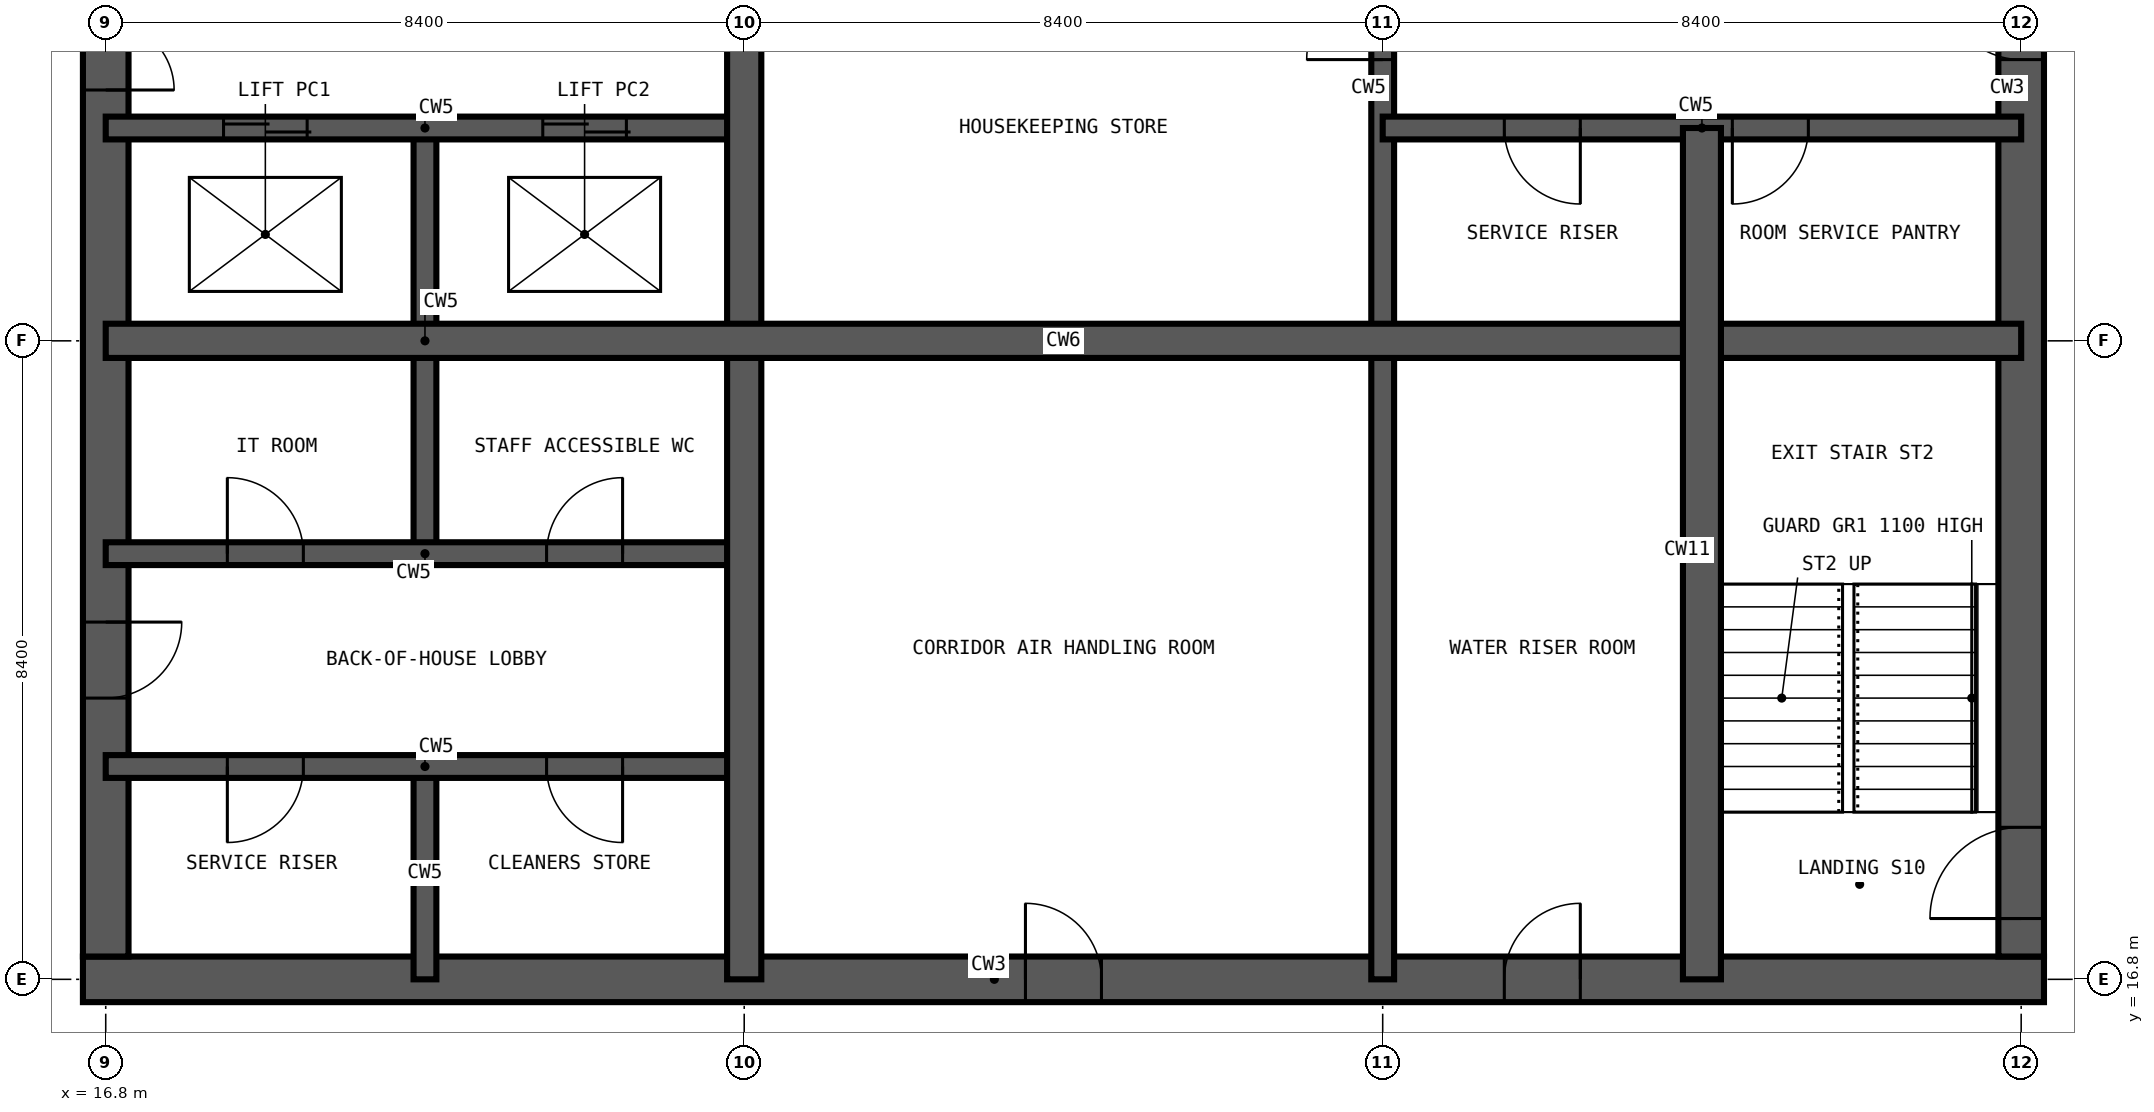
"""IFC4 building model, lengths in metres.
Left out: names, types, materials, properties, quantities, classifications, styles, units other than length and angle.
Written with IfcOpenShell. Run it as: python <this file> out.ifc"""

import sys

from ifc_helpers import new_model, si_unit, direction, frame, frame_2d, origin, place, context, subcontext, project, spatial, rectangle, extrude, element, fill, save


model = new_model("IFC4")
c1 = context("Model", 3, precision=1e-05, world=origin(), true_north=direction((0.0, 1.0)))
c2 = subcontext(c1, "Body", "Model", "MODEL_VIEW")
j1 = project(units=[si_unit("LENGTHUNIT", "METRE"), si_unit("PLANEANGLEUNIT", "RADIAN")], contexts=[c1])
p1 = place(None, origin())
s1 = spatial("IfcSite", under=j1, at=p1, CompositionType="ELEMENT")
p2 = place(p1, origin())
s2 = spatial("IfcBuilding", under=s1, at=p2, CompositionType="ELEMENT")
p3 = place(p2, frame((0.0, 0.0, 198.6)))
s3 = spatial("IfcBuildingStorey", under=s2, at=p3, CompositionType="ELEMENT", Elevation=198.6)
p4 = place(p3, frame((16.5, 16.8, -0.35), z_axis=(0.0, 0.0, 1.0), x_axis=(1.0, 0.0, 0.0)))
e1 = element("IfcWall", 1, at=p4, inside=s3, PredefinedType="SHEAR", context=c2, shape_type="SweptSolid", body=[
    extrude(rectangle(XDim=25.8, YDim=0.6, at=frame_2d((12.9, 0.0))), origin(), (0.0, 0.0, 1.0), 3.6),
])
p5 = place(p4, frame((12.4, 0.0, 0.35)))
e2 = element("IfcOpeningElement", 2, at=p5, cuts=e1, PredefinedType="OPENING", context=c2, shape_type="SweptSolid", body=[
    extrude(rectangle(XDim=1.0, YDim=2.1, at=frame_2d((0.5, 1.05))), frame((0.0, 0.31, 0.0), z_axis=(0.0, -1.0, 0.0), x_axis=(1.0, 0.0, 0.0)), (0.0, 0.0, 1.0), 0.62),
])
p6 = place(p4, frame((18.7, 0.0, 0.35)))
e3 = element("IfcOpeningElement", 3, at=p6, cuts=e1, PredefinedType="OPENING", context=c2, shape_type="SweptSolid", body=[
    extrude(rectangle(XDim=1.0, YDim=2.1, at=frame_2d((0.5, 1.05))), frame((0.0, 0.31, 0.0), z_axis=(0.0, -1.0, 0.0), x_axis=(1.0, 0.0, 0.0)), (0.0, 0.0, 1.0), 0.62),
])
p7 = place(p3, frame((42.0, 17.1, -0.35), z_axis=(0.0, 0.0, 1.0), x_axis=(0.0, 1.0, 0.0)))
e4 = element("IfcWall", 4, at=p7, inside=s3, PredefinedType="SHEAR", context=c2, shape_type="SweptSolid", body=[
    extrude(rectangle(XDim=24.6, YDim=0.6, at=frame_2d((12.3, 0.0))), origin(), (0.0, 0.0, 1.0), 3.6),
])
p8 = place(p7, frame((0.5, 0.0, 0.35)))
e5 = element("IfcOpeningElement", 5, at=p8, cuts=e4, PredefinedType="OPENING", context=c2, shape_type="SweptSolid", body=[
    extrude(rectangle(XDim=1.2, YDim=2.2, at=frame_2d((0.6, 1.1))), frame((0.0, 0.31, 0.0), z_axis=(0.0, -1.0, 0.0), x_axis=(1.0, 0.0, 0.0)), (0.0, 0.0, 1.0), 0.62),
])
p9 = place(p7, frame((11.8, 0.0, 0.35)))
e6 = element("IfcOpeningElement", 6, at=p9, cuts=e4, PredefinedType="OPENING", context=c2, shape_type="SweptSolid", body=[
    extrude(rectangle(XDim=1.0, YDim=2.1, at=frame_2d((0.5, 1.05))), frame((0.0, 0.31, 0.0), z_axis=(0.0, -1.0, 0.0), x_axis=(1.0, 0.0, 0.0)), (0.0, 0.0, 1.0), 0.62),
])
p10 = place(p7, frame((20.2, 0.0, 0.35)))
e7 = element("IfcOpeningElement", 7, at=p10, cuts=e4, PredefinedType="OPENING", context=c2, shape_type="SweptSolid", body=[
    extrude(rectangle(XDim=1.0, YDim=2.1, at=frame_2d((0.5, 1.05))), frame((0.0, 0.31, 0.0), z_axis=(0.0, -1.0, 0.0), x_axis=(1.0, 0.0, 0.0)), (0.0, 0.0, 1.0), 0.62),
])
p11 = place(p3, frame((16.8, 41.7, -0.35), z_axis=(0.0, 0.0, 1.0), x_axis=(0.0, -1.0, 0.0)))
e8 = element("IfcWall", 8, at=p11, inside=s3, PredefinedType="SHEAR", context=c2, shape_type="SweptSolid", body=[
    extrude(rectangle(XDim=24.6, YDim=0.6, at=frame_2d((12.3, 0.0))), origin(), (0.0, 0.0, 1.0), 3.6),
])
p12 = place(p11, frame((11.4, 0.0, 0.35)))
e9 = element("IfcOpeningElement", 9, at=p12, cuts=e8, PredefinedType="OPENING", context=c2, shape_type="SweptSolid", body=[
    extrude(rectangle(XDim=1.8, YDim=2.2, at=frame_2d((0.9, 1.1))), frame((0.0, 0.31, 0.0), z_axis=(0.0, -1.0, 0.0), x_axis=(1.0, 0.0, 0.0)), (0.0, 0.0, 1.0), 0.62),
])
p13 = place(p11, frame((20.2, 0.0, 0.35)))
e10 = element("IfcOpeningElement", 10, at=p13, cuts=e8, PredefinedType="OPENING", context=c2, shape_type="SweptSolid", body=[
    extrude(rectangle(XDim=1.0, YDim=2.1, at=frame_2d((0.5, 1.05))), frame((0.0, 0.31, 0.0), z_axis=(0.0, -1.0, 0.0), x_axis=(1.0, 0.0, 0.0)), (0.0, 0.0, 1.0), 0.62),
])
p14 = place(p11, frame((5.5, 0.0, 0.35)))
e11 = element("IfcOpeningElement", 11, at=p14, cuts=e8, PredefinedType="OPENING", context=c2, shape_type="SweptSolid", body=[
    extrude(rectangle(XDim=1.0, YDim=2.1, at=frame_2d((0.5, 1.05))), frame((0.0, 0.31, 0.0), z_axis=(0.0, -1.0, 0.0), x_axis=(1.0, 0.0, 0.0)), (0.0, 0.0, 1.0), 0.62),
])
p15 = place(p3, frame((21.0, 16.8, -0.35), z_axis=(0.0, 0.0, 1.0), x_axis=(0.0, 1.0, 0.0)))
e12 = element("IfcWall", 12, at=p15, inside=s3, PredefinedType="SHEAR", context=c2, shape_type="SweptSolid", body=[
    extrude(rectangle(XDim=2.8, YDim=0.3, at=frame_2d((1.4, 0.0))), origin(), (0.0, 0.0, 1.0), 3.6),
])
p16 = place(p3, frame((21.0, 22.4, -0.35), z_axis=(0.0, 0.0, 1.0), x_axis=(0.0, 1.0, 0.0)))
e13 = element("IfcWall", 13, at=p16, inside=s3, PredefinedType="SHEAR", context=c2, shape_type="SweptSolid", body=[
    extrude(rectangle(XDim=5.6, YDim=0.3, at=frame_2d((2.8, 0.0))), origin(), (0.0, 0.0, 1.0), 3.6),
])
p17 = place(p3, frame((33.6, 16.8, -0.35), z_axis=(0.0, 0.0, 1.0), x_axis=(0.0, 1.0, 0.0)))
e14 = element("IfcWall", 14, at=p17, inside=s3, PredefinedType="SHEAR", context=c2, shape_type="SweptSolid", body=[
    extrude(rectangle(XDim=25.2, YDim=0.3, at=frame_2d((12.6, 0.0))), origin(), (0.0, 0.0, 1.0), 3.6),
])
p18 = place(p17, frame((22.5, 0.0, 0.35)))
e15 = element("IfcOpeningElement", 15, at=p18, cuts=e14, PredefinedType="OPENING", context=c2, shape_type="SweptSolid", body=[
    extrude(rectangle(XDim=1.2, YDim=2.2, at=frame_2d((0.6, 1.1))), frame((0.0, 0.16, 0.0), z_axis=(0.0, -1.0, 0.0), x_axis=(1.0, 0.0, 0.0)), (0.0, 0.0, 1.0), 0.32),
])
p19 = place(p17, frame((18.3, 0.0, 0.35)))
e16 = element("IfcOpeningElement", 16, at=p19, cuts=e14, PredefinedType="OPENING", context=c2, shape_type="SweptSolid", body=[
    extrude(rectangle(XDim=1.2, YDim=2.2, at=frame_2d((0.6, 1.1))), frame((0.0, 0.16, 0.0), z_axis=(0.0, -1.0, 0.0), x_axis=(1.0, 0.0, 0.0)), (0.0, 0.0, 1.0), 0.32),
])
p20 = place(p17, frame((12.1, 0.0, 0.35)))
e17 = element("IfcOpeningElement", 17, at=p20, cuts=e14, PredefinedType="OPENING", context=c2, shape_type="SweptSolid", body=[
    extrude(rectangle(XDim=1.0, YDim=2.1, at=frame_2d((0.5, 1.05))), frame((0.0, 0.16, 0.0), z_axis=(0.0, -1.0, 0.0), x_axis=(1.0, 0.0, 0.0)), (0.0, 0.0, 1.0), 0.32),
])
p21 = place(p3, frame((16.8, 19.6, -0.35), z_axis=(0.0, 0.0, 1.0), x_axis=(1.0, 0.0, 0.0)))
e18 = element("IfcWall", 18, at=p21, inside=s3, PredefinedType="SHEAR", context=c2, shape_type="SweptSolid", body=[
    extrude(rectangle(XDim=8.4, YDim=0.3, at=frame_2d((4.2, 0.0))), origin(), (0.0, 0.0, 1.0), 3.6),
])
p22 = place(p21, frame((1.6, 0.0, 0.35)))
e19 = element("IfcOpeningElement", 19, at=p22, cuts=e18, PredefinedType="OPENING", context=c2, shape_type="SweptSolid", body=[
    extrude(rectangle(XDim=1.0, YDim=2.1, at=frame_2d((0.5, 1.05))), frame((0.0, 0.16, 0.0), z_axis=(0.0, -1.0, 0.0), x_axis=(1.0, 0.0, 0.0)), (0.0, 0.0, 1.0), 0.32),
])
p23 = place(p21, frame((5.8, 0.0, 0.35)))
e20 = element("IfcOpeningElement", 20, at=p23, cuts=e18, PredefinedType="OPENING", context=c2, shape_type="SweptSolid", body=[
    extrude(rectangle(XDim=1.0, YDim=2.1, at=frame_2d((0.5, 1.05))), frame((0.0, 0.16, 0.0), z_axis=(0.0, -1.0, 0.0), x_axis=(1.0, 0.0, 0.0)), (0.0, 0.0, 1.0), 0.32),
])
p24 = place(p3, frame((16.8, 22.4, -0.35), z_axis=(0.0, 0.0, 1.0), x_axis=(1.0, 0.0, 0.0)))
e21 = element("IfcWall", 21, at=p24, inside=s3, PredefinedType="SHEAR", context=c2, shape_type="SweptSolid", body=[
    extrude(rectangle(XDim=8.4, YDim=0.3, at=frame_2d((4.2, 0.0))), origin(), (0.0, 0.0, 1.0), 3.6),
])
p25 = place(p24, frame((1.6, 0.0, 0.35)))
e22 = element("IfcOpeningElement", 22, at=p25, cuts=e21, PredefinedType="OPENING", context=c2, shape_type="SweptSolid", body=[
    extrude(rectangle(XDim=1.0, YDim=2.1, at=frame_2d((0.5, 1.05))), frame((0.0, 0.16, 0.0), z_axis=(0.0, -1.0, 0.0), x_axis=(1.0, 0.0, 0.0)), (0.0, 0.0, 1.0), 0.32),
])
p26 = place(p24, frame((5.8, 0.0, 0.35)))
e23 = element("IfcOpeningElement", 23, at=p26, cuts=e21, PredefinedType="OPENING", context=c2, shape_type="SweptSolid", body=[
    extrude(rectangle(XDim=1.0, YDim=2.1, at=frame_2d((0.5, 1.05))), frame((0.0, 0.16, 0.0), z_axis=(0.0, -1.0, 0.0), x_axis=(1.0, 0.0, 0.0)), (0.0, 0.0, 1.0), 0.32),
])
p27 = place(p3, frame((16.8, 28.0, -0.35), z_axis=(0.0, 0.0, 1.0), x_axis=(1.0, 0.0, 0.0)))
e24 = element("IfcWall", 24, at=p27, inside=s3, PredefinedType="SHEAR", context=c2, shape_type="SweptSolid", body=[
    extrude(rectangle(XDim=8.4, YDim=0.3, at=frame_2d((4.2, 0.0))), origin(), (0.0, 0.0, 1.0), 3.6),
])
p28 = place(p27, frame((1.55, 0.0, 0.35)))
e25 = element("IfcOpeningElement", 25, at=p28, cuts=e24, PredefinedType="OPENING", context=c2, shape_type="SweptSolid", body=[
    extrude(rectangle(XDim=1.1, YDim=2.2, at=frame_2d((0.55, 1.1))), frame((0.0, 0.16, 0.0), z_axis=(0.0, -1.0, 0.0), x_axis=(1.0, 0.0, 0.0)), (0.0, 0.0, 1.0), 0.32),
])
p29 = place(p27, frame((5.75, 0.0, 0.35)))
e26 = element("IfcOpeningElement", 26, at=p29, cuts=e24, PredefinedType="OPENING", context=c2, shape_type="SweptSolid", body=[
    extrude(rectangle(XDim=1.1, YDim=2.2, at=frame_2d((0.55, 1.1))), frame((0.0, 0.16, 0.0), z_axis=(0.0, -1.0, 0.0), x_axis=(1.0, 0.0, 0.0)), (0.0, 0.0, 1.0), 0.32),
])
p30 = place(p3, frame((33.6, 28.0, -0.35), z_axis=(0.0, 0.0, 1.0), x_axis=(1.0, 0.0, 0.0)))
e27 = element("IfcWall", 27, at=p30, inside=s3, PredefinedType="SHEAR", context=c2, shape_type="SweptSolid", body=[
    extrude(rectangle(XDim=8.4, YDim=0.3, at=frame_2d((4.2, 0.0))), origin(), (0.0, 0.0, 1.0), 3.6),
])
p31 = place(p30, frame((1.6, 0.0, 0.35)))
e28 = element("IfcOpeningElement", 28, at=p31, cuts=e27, PredefinedType="OPENING", context=c2, shape_type="SweptSolid", body=[
    extrude(rectangle(XDim=1.0, YDim=2.1, at=frame_2d((0.5, 1.05))), frame((0.0, 0.16, 0.0), z_axis=(0.0, -1.0, 0.0), x_axis=(1.0, 0.0, 0.0)), (0.0, 0.0, 1.0), 0.32),
])
p32 = place(p30, frame((4.6, 0.0, 0.35)))
e29 = element("IfcOpeningElement", 29, at=p32, cuts=e27, PredefinedType="OPENING", context=c2, shape_type="SweptSolid", body=[
    extrude(rectangle(XDim=1.0, YDim=2.1, at=frame_2d((0.5, 1.05))), frame((0.0, 0.16, 0.0), z_axis=(0.0, -1.0, 0.0), x_axis=(1.0, 0.0, 0.0)), (0.0, 0.0, 1.0), 0.32),
])
for number, where, z_axis, x_axis in (
    (30, (25.2, 16.8, -0.35), (0.0, 0.0, 1.0), (0.0, 1.0, 0.0)),
    (31, (16.8, 25.2, -0.35), (0.0, 0.0, 1.0), (1.0, 0.0, 0.0)),
):
    element("IfcWall", number, at=place(p3, frame(where, z_axis=z_axis, x_axis=x_axis)), inside=s3, PredefinedType="SHEAR", context=c2, shape_type="SweptSolid", body=[
        extrude(rectangle(XDim=25.2, YDim=0.45, at=frame_2d((12.6, 0.0))), origin(), (0.0, 0.0, 1.0), 3.6),
    ])
p33 = place(p3, frame((37.8, 16.8, -0.35), z_axis=(0.0, 0.0, 1.0), x_axis=(0.0, 1.0, 0.0)))
e32 = element("IfcWall", 32, at=p33, inside=s3, PredefinedType="SHEAR", context=c2, shape_type="SweptSolid", body=[
    extrude(rectangle(XDim=11.2, YDim=0.5, at=frame_2d((5.6, 0.0))), origin(), (0.0, 0.0, 1.0), 3.6),
])
p34 = place(p8, origin())
e33 = element("IfcDoor", 33, at=p34, inside=s3, OperationType="SINGLE_SWING_LEFT", PredefinedType="DOOR", context=c2, shape_type="SweptSolid", body=[
    extrude(rectangle(XDim=1.2, YDim=2.2, at=frame_2d((0.6, 1.1))), frame((0.0, 0.025, 0.0), z_axis=(0.0, -1.0, 0.0), x_axis=(1.0, 0.0, 0.0)), (0.0, 0.0, 1.0), 0.05),
])
fill(e5, e33)
p35 = place(p28, origin())
e34 = element("IfcDoor", 34, at=p35, inside=s3, OperationType="DOUBLE_DOOR_SLIDING", PredefinedType="DOOR", context=c2, shape_type="SweptSolid", body=[
    extrude(rectangle(XDim=1.1, YDim=2.2, at=frame_2d((0.55, 1.1))), frame((0.0, 0.025, 0.0), z_axis=(0.0, -1.0, 0.0), x_axis=(1.0, 0.0, 0.0)), (0.0, 0.0, 1.0), 0.05),
])
fill(e25, e34)
p36 = place(p29, origin())
e35 = element("IfcDoor", 35, at=p36, inside=s3, OperationType="DOUBLE_DOOR_SLIDING", PredefinedType="DOOR", context=c2, shape_type="SweptSolid", body=[
    extrude(rectangle(XDim=1.1, YDim=2.2, at=frame_2d((0.55, 1.1))), frame((0.0, 0.025, 0.0), z_axis=(0.0, -1.0, 0.0), x_axis=(1.0, 0.0, 0.0)), (0.0, 0.0, 1.0), 0.05),
])
fill(e26, e35)
p37 = place(p12, origin())
e36 = element("IfcDoor", 36, at=p37, inside=s3, OperationType="DOUBLE_DOOR_DOUBLE_SWING", PredefinedType="DOOR", context=c2, shape_type="SweptSolid", body=[
    extrude(rectangle(XDim=1.8, YDim=2.2, at=frame_2d((0.9, 1.1))), frame((0.0, 0.025, 0.0), z_axis=(0.0, -1.0, 0.0), x_axis=(1.0, 0.0, 0.0)), (0.0, 0.0, 1.0), 0.05),
])
fill(e9, e36)
p38 = place(p22, frame((1.0, 0.0, 0.0), z_axis=(0.0, 0.0, 1.0), x_axis=(-1.0, 0.0, 0.0)))
e37 = element("IfcDoor", 37, at=p38, inside=s3, OperationType="SINGLE_SWING_RIGHT", PredefinedType="DOOR", context=c2, shape_type="SweptSolid", body=[
    extrude(rectangle(XDim=1.0, YDim=2.1, at=frame_2d((0.5, 1.05))), frame((0.0, 0.025, 0.0), z_axis=(0.0, -1.0, 0.0), x_axis=(1.0, 0.0, 0.0)), (0.0, 0.0, 1.0), 0.05),
])
fill(e19, e37)
p39 = place(p23, frame((1.0, 0.0, 0.0), z_axis=(0.0, 0.0, 1.0), x_axis=(-1.0, 0.0, 0.0)))
e38 = element("IfcDoor", 38, at=p39, inside=s3, OperationType="SINGLE_SWING_LEFT", PredefinedType="DOOR", context=c2, shape_type="SweptSolid", body=[
    extrude(rectangle(XDim=1.0, YDim=2.1, at=frame_2d((0.5, 1.05))), frame((0.0, 0.025, 0.0), z_axis=(0.0, -1.0, 0.0), x_axis=(1.0, 0.0, 0.0)), (0.0, 0.0, 1.0), 0.05),
])
fill(e20, e38)
p40 = place(p25, origin())
e39 = element("IfcDoor", 39, at=p40, inside=s3, OperationType="SINGLE_SWING_LEFT", PredefinedType="DOOR", context=c2, shape_type="SweptSolid", body=[
    extrude(rectangle(XDim=1.0, YDim=2.1, at=frame_2d((0.5, 1.05))), frame((0.0, 0.025, 0.0), z_axis=(0.0, -1.0, 0.0), x_axis=(1.0, 0.0, 0.0)), (0.0, 0.0, 1.0), 0.05),
])
fill(e22, e39)
p41 = place(p26, origin())
e40 = element("IfcDoor", 40, at=p41, inside=s3, OperationType="SINGLE_SWING_RIGHT", PredefinedType="DOOR", context=c2, shape_type="SweptSolid", body=[
    extrude(rectangle(XDim=1.0, YDim=2.1, at=frame_2d((0.5, 1.05))), frame((0.0, 0.025, 0.0), z_axis=(0.0, -1.0, 0.0), x_axis=(1.0, 0.0, 0.0)), (0.0, 0.0, 1.0), 0.05),
])
fill(e23, e40)
p42 = place(p13, origin())
e41 = element("IfcDoor", 41, at=p42, inside=s3, OperationType="SINGLE_SWING_LEFT", PredefinedType="DOOR", context=c2, shape_type="SweptSolid", body=[
    extrude(rectangle(XDim=1.0, YDim=2.1, at=frame_2d((0.5, 1.05))), frame((0.0, 0.025, 0.0), z_axis=(0.0, -1.0, 0.0), x_axis=(1.0, 0.0, 0.0)), (0.0, 0.0, 1.0), 0.05),
])
fill(e10, e41)
p43 = place(p20, origin())
e42 = element("IfcDoor", 42, at=p43, inside=s3, OperationType="SINGLE_SWING_LEFT", PredefinedType="DOOR", context=c2, shape_type="SweptSolid", body=[
    extrude(rectangle(XDim=1.0, YDim=2.1, at=frame_2d((0.5, 1.05))), frame((0.0, 0.025, 0.0), z_axis=(0.0, -1.0, 0.0), x_axis=(1.0, 0.0, 0.0)), (0.0, 0.0, 1.0), 0.05),
])
fill(e17, e42)
p44 = place(p31, frame((1.0, 0.0, 0.0), z_axis=(0.0, 0.0, 1.0), x_axis=(-1.0, 0.0, 0.0)))
e43 = element("IfcDoor", 43, at=p44, inside=s3, OperationType="SINGLE_SWING_LEFT", PredefinedType="DOOR", context=c2, shape_type="SweptSolid", body=[
    extrude(rectangle(XDim=1.0, YDim=2.1, at=frame_2d((0.5, 1.05))), frame((0.0, 0.025, 0.0), z_axis=(0.0, -1.0, 0.0), x_axis=(1.0, 0.0, 0.0)), (0.0, 0.0, 1.0), 0.05),
])
fill(e28, e43)
p45 = place(p32, frame((1.0, 0.0, 0.0), z_axis=(0.0, 0.0, 1.0), x_axis=(-1.0, 0.0, 0.0)))
e44 = element("IfcDoor", 44, at=p45, inside=s3, OperationType="SINGLE_SWING_RIGHT", PredefinedType="DOOR", context=c2, shape_type="SweptSolid", body=[
    extrude(rectangle(XDim=1.0, YDim=2.1, at=frame_2d((0.5, 1.05))), frame((0.0, 0.025, 0.0), z_axis=(0.0, -1.0, 0.0), x_axis=(1.0, 0.0, 0.0)), (0.0, 0.0, 1.0), 0.05),
])
fill(e29, e44)
p46 = place(p9, origin())
e45 = element("IfcDoor", 45, at=p46, inside=s3, OperationType="SINGLE_SWING_RIGHT", PredefinedType="DOOR", context=c2, shape_type="SweptSolid", body=[
    extrude(rectangle(XDim=1.0, YDim=2.1, at=frame_2d((0.5, 1.05))), frame((0.0, 0.025, 0.0), z_axis=(0.0, -1.0, 0.0), x_axis=(1.0, 0.0, 0.0)), (0.0, 0.0, 1.0), 0.05),
])
fill(e6, e45)
p47 = place(p5, origin())
e46 = element("IfcDoor", 46, at=p47, inside=s3, OperationType="SINGLE_SWING_LEFT", PredefinedType="DOOR", context=c2, shape_type="SweptSolid", body=[
    extrude(rectangle(XDim=1.0, YDim=2.1, at=frame_2d((0.5, 1.05))), frame((0.0, 0.025, 0.0), z_axis=(0.0, -1.0, 0.0), x_axis=(1.0, 0.0, 0.0)), (0.0, 0.0, 1.0), 0.05),
])
fill(e2, e46)
p48 = place(p6, origin())
e47 = element("IfcDoor", 47, at=p48, inside=s3, OperationType="SINGLE_SWING_RIGHT", PredefinedType="DOOR", context=c2, shape_type="SweptSolid", body=[
    extrude(rectangle(XDim=1.0, YDim=2.1, at=frame_2d((0.5, 1.05))), frame((0.0, 0.025, 0.0), z_axis=(0.0, -1.0, 0.0), x_axis=(1.0, 0.0, 0.0)), (0.0, 0.0, 1.0), 0.05),
])
fill(e3, e47)
save(model, sys.argv[1])
